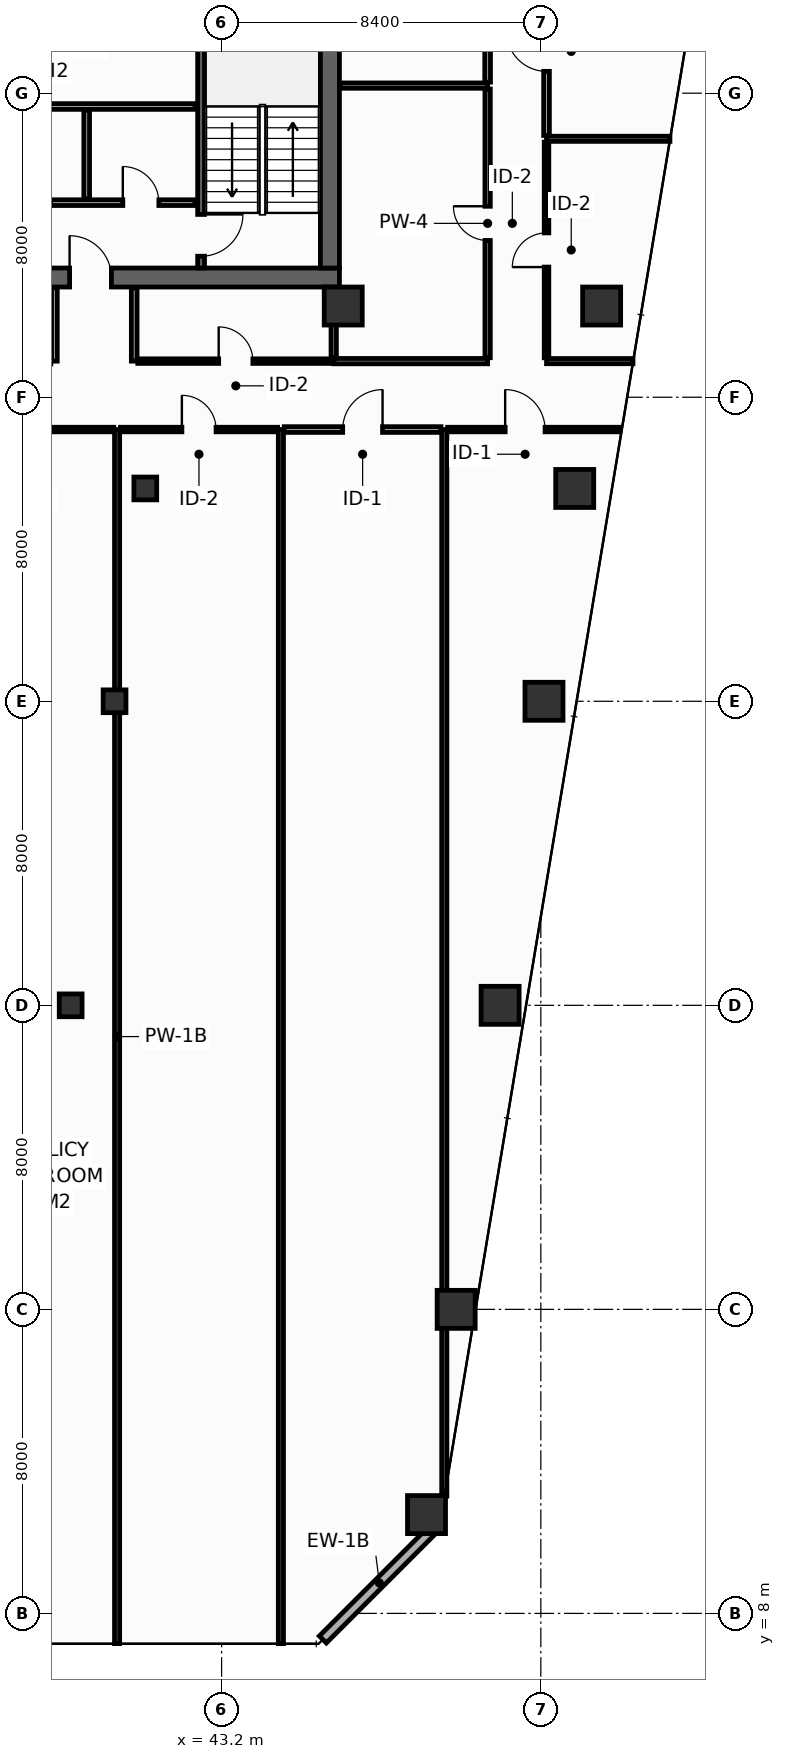
"""IFC4 building model, lengths in metres.
Left out: names, types, materials, properties, quantities, classifications, styles, units other than length and angle.
Written with IfcOpenShell. Run it as: python <this file> out.ifc"""

import sys

from ifc_helpers import new_model, si_unit, direction, frame, frame_2d, origin, origin_2d, place, context, subcontext, project, spatial, rectangle, hollow_rectangle, extrude, element, fill, save


model = new_model("IFC4")
c1 = context("Model", 3, precision=1e-05, world=origin(), true_north=direction((0.0, 1.0)))
c2 = subcontext(c1, "Body", "Model", "MODEL_VIEW")
j1 = project(units=[si_unit("LENGTHUNIT", "METRE"), si_unit("PLANEANGLEUNIT", "RADIAN")], contexts=[c1])
p1 = place(None, origin())
s1 = spatial("IfcSite", under=j1, at=p1, CompositionType="ELEMENT")
p2 = place(p1, origin())
s2 = spatial("IfcBuilding", under=s1, at=p2, CompositionType="ELEMENT")
p3 = place(p2, frame((0.0, 0.0, 144.8)))
s3 = spatial("IfcBuildingStorey", under=s2, at=p3, CompositionType="ELEMENT", Elevation=144.8)
p4 = place(p3, frame((13.6, 43.15, 0.0), z_axis=(0.0, 0.0, 1.0), x_axis=(1.0, 0.0, 0.0)))
e1 = element("IfcWall", 1, at=p4, inside=s3, PredefinedType="SHEAR", context=c2, shape_type="SweptSolid", body=[
    extrude(rectangle(XDim=32.7, YDim=0.5, at=frame_2d((16.35, 0.0))), origin(), (0.0, 0.0, 1.0), 3.55),
])
p5 = place(p4, frame((5.4, 0.0, 0.0)))
e2 = element("IfcOpeningElement", 2, at=p5, cuts=e1, PredefinedType="OPENING", context=c2, shape_type="SweptSolid", body=[
    extrude(rectangle(XDim=1.1, YDim=2.15, at=frame_2d((0.55, 1.075))), frame((0.0, 0.26, 0.0), z_axis=(0.0, -1.0, 0.0), x_axis=(1.0, 0.0, 0.0)), (0.0, 0.0, 1.0), 0.52),
])
p6 = place(p4, frame((25.6, 0.0, 0.0)))
e3 = element("IfcOpeningElement", 3, at=p6, cuts=e1, PredefinedType="OPENING", context=c2, shape_type="SweptSolid", body=[
    extrude(rectangle(XDim=1.1, YDim=2.15, at=frame_2d((0.55, 1.075))), frame((0.0, 0.26, 0.0), z_axis=(0.0, -1.0, 0.0), x_axis=(1.0, 0.0, 0.0)), (0.0, 0.0, 1.0), 0.52),
])
p7 = place(p3, frame((46.05, 43.4, 0.0), z_axis=(0.0, 0.0, 1.0), x_axis=(0.0, 1.0, 0.0)))
e4 = element("IfcWall", 4, at=p7, inside=s3, PredefinedType="SHEAR", context=c2, shape_type="SweptSolid", body=[
    extrude(rectangle(XDim=10.4, YDim=0.5, at=frame_2d((5.2, 0.0))), origin(), (0.0, 0.0, 1.0), 3.55),
])
for number, where, z_axis, x_axis in (
    (5, (46.4, 42.4, 0.0), (0.0, 0.0, 1.0), (1.0, 0.0, 0.0)),
    (6, (53.2, 42.4, 0.0), (0.0, 0.0, 1.0), (1.0, 0.0, 0.0)),
    (7, (48.592, 10.6, 0.0), (0.0, 0.0, 1.0), (1.0, 0.0, 0.0)),
    (8, (49.372, 16.0, 0.0), (0.0, 0.0, 1.0), (1.0, 0.0, 0.0)),
    (9, (50.528, 24.0, 0.0), (0.0, 0.0, 1.0), (1.0, 0.0, 0.0)),
):
    element("IfcColumn", number, at=place(p3, frame(where, z_axis=z_axis, x_axis=x_axis)), inside=s3, PredefinedType="COLUMN", context=c2, shape_type="SweptSolid", body=[
        extrude(hollow_rectangle(XDim=1.0, YDim=1.0, WallThickness=0.045, at=origin_2d()), origin(), (0.0, 0.0, 1.0), 3.8),
    ])
p8 = place(p3, frame((39.228, 24.0, 0.0), z_axis=(0.0, 0.0, 1.0), x_axis=(1.0, 0.0, 0.0)))
e10 = element("IfcColumn", 10, at=p8, inside=s3, PredefinedType="COLUMN", context=c2, shape_type="SweptSolid", body=[
    extrude(hollow_rectangle(XDim=0.6, YDim=0.6, WallThickness=0.028, at=origin_2d()), origin(), (0.0, 0.0, 1.0), 3.8),
])
p9 = place(p3, frame((51.683, 32.0, 0.0), z_axis=(0.0, 0.0, 1.0), x_axis=(1.0, 0.0, 0.0)))
e11 = element("IfcColumn", 11, at=p9, inside=s3, PredefinedType="COLUMN", context=c2, shape_type="SweptSolid", body=[
    extrude(hollow_rectangle(XDim=1.0, YDim=1.0, WallThickness=0.045, at=origin_2d()), origin(), (0.0, 0.0, 1.0), 3.8),
])
p10 = place(p3, frame((40.383, 32.0, 0.0), z_axis=(0.0, 0.0, 1.0), x_axis=(1.0, 0.0, 0.0)))
e12 = element("IfcColumn", 12, at=p10, inside=s3, PredefinedType="COLUMN", context=c2, shape_type="SweptSolid", body=[
    extrude(hollow_rectangle(XDim=0.6, YDim=0.6, WallThickness=0.028, at=origin_2d()), origin(), (0.0, 0.0, 1.0), 3.8),
])
p11 = place(p3, frame((52.492, 37.6, 0.0), z_axis=(0.0, 0.0, 1.0), x_axis=(1.0, 0.0, 0.0)))
e13 = element("IfcColumn", 13, at=p11, inside=s3, PredefinedType="COLUMN", context=c2, shape_type="SweptSolid", body=[
    extrude(hollow_rectangle(XDim=1.0, YDim=1.0, WallThickness=0.045, at=origin_2d()), origin(), (0.0, 0.0, 1.0), 3.8),
])
p12 = place(p3, frame((41.192, 37.6, 0.0), z_axis=(0.0, 0.0, 1.0), x_axis=(1.0, 0.0, 0.0)))
e14 = element("IfcColumn", 14, at=p12, inside=s3, PredefinedType="COLUMN", context=c2, shape_type="SweptSolid", body=[
    extrude(hollow_rectangle(XDim=0.6, YDim=0.6, WallThickness=0.028, at=origin_2d()), origin(), (0.0, 0.0, 1.0), 3.8),
])
p13 = place(p3, frame((42.66, 53.8, 0.0), z_axis=(0.0, 0.0, 1.0), x_axis=(0.0, -1.0, 0.0)))
e15 = element("IfcWall", 15, at=p13, inside=s3, PredefinedType="SHEAR", context=c2, shape_type="SweptSolid", body=[
    extrude(rectangle(XDim=10.4, YDim=0.18, at=frame_2d((5.2, 0.0))), origin(), (0.0, 0.0, 1.0), 3.55),
])
p14 = place(p13, frame((8.99, 0.0, 0.0)))
e16 = element("IfcOpeningElement", 16, at=p14, cuts=e15, PredefinedType="OPENING", context=c2, shape_type="SweptSolid", body=[
    extrude(rectangle(XDim=1.1, YDim=2.15, at=frame_2d((0.55, 1.075))), frame((0.0, 0.1, 0.0), z_axis=(0.0, -1.0, 0.0), x_axis=(1.0, 0.0, 0.0)), (0.0, 0.0, 1.0), 0.2),
])
p15 = place(p3, frame((33.95, 45.12, 0.0), z_axis=(0.0, 0.0, 1.0), x_axis=(1.0, 0.0, 0.0)))
e17 = element("IfcWall", 17, at=p15, inside=s3, PredefinedType="PARTITIONING", context=c2, shape_type="SweptSolid", body=[
    extrude(rectangle(XDim=8.55, YDim=0.15, at=frame_2d((4.275, 0.0))), origin(), (0.0, 0.0, 1.0), 3.55),
])
p16 = place(p15, frame((0.95, 0.0, 0.0)))
e18 = element("IfcOpeningElement", 18, at=p16, cuts=e17, PredefinedType="OPENING", context=c2, shape_type="SweptSolid", body=[
    extrude(rectangle(XDim=0.95, YDim=2.15, at=frame_2d((0.475, 1.075))), frame((0.0, 0.085, 0.0), z_axis=(0.0, -1.0, 0.0), x_axis=(1.0, 0.0, 0.0)), (0.0, 0.0, 1.0), 0.17),
])
p17 = place(p15, frame((3.8, 0.0, 0.0)))
e19 = element("IfcOpeningElement", 19, at=p17, cuts=e17, PredefinedType="OPENING", context=c2, shape_type="SweptSolid", body=[
    extrude(rectangle(XDim=0.95, YDim=2.15, at=frame_2d((0.475, 1.075))), frame((0.0, 0.085, 0.0), z_axis=(0.0, -1.0, 0.0), x_axis=(1.0, 0.0, 0.0)), (0.0, 0.0, 1.0), 0.17),
])
p18 = place(p15, frame((6.65, 0.0, 0.0)))
e20 = element("IfcOpeningElement", 20, at=p18, cuts=e17, PredefinedType="OPENING", context=c2, shape_type="SweptSolid", body=[
    extrude(rectangle(XDim=0.95, YDim=2.15, at=frame_2d((0.475, 1.075))), frame((0.0, 0.085, 0.0), z_axis=(0.0, -1.0, 0.0), x_axis=(1.0, 0.0, 0.0)), (0.0, 0.0, 1.0), 0.17),
])
p19 = place(p3, frame((33.95, 47.65, 0.0), z_axis=(0.0, 0.0, 1.0), x_axis=(1.0, 0.0, 0.0)))
e21 = element("IfcWall", 21, at=p19, inside=s3, PredefinedType="PARTITIONING", context=c2, shape_type="SweptSolid", body=[
    extrude(rectangle(XDim=8.55, YDim=0.15, at=frame_2d((4.275, 0.0))), origin(), (0.0, 0.0, 1.0), 3.55),
])
p20 = place(p3, frame((39.65, 45.22, 0.0), z_axis=(0.0, 0.0, 1.0), x_axis=(0.0, 1.0, 0.0)))
e22 = element("IfcWall", 22, at=p20, inside=s3, PredefinedType="PARTITIONING", context=c2, shape_type="SweptSolid", body=[
    extrude(rectangle(XDim=2.33, YDim=0.15, at=frame_2d((1.165, 0.0))), origin(), (0.0, 0.0, 1.0), 3.55),
])
p21 = place(p3, frame((45.864, 7.313, 0.0), z_axis=(0.0, 0.0, 1.0), x_axis=(0.70707775441, 0.707135806771, 0.0)))
e23 = element("IfcWall", 23, at=p21, inside=s3, PredefinedType="STANDARD", context=c2, shape_type="SweptSolid", body=[
    extrude(rectangle(XDim=4.206, YDim=0.26, at=frame_2d((2.103, 0.0))), origin(), (0.0, 0.0, 1.0), 3.55),
])
p22 = place(p3, frame((46.15, 40.95, 0.0), z_axis=(0.0, 0.0, 1.0), x_axis=(1.0, 0.0, 0.0)))
e24 = element("IfcWall", 24, at=p22, inside=s3, PredefinedType="PARTITIONING", context=c2, shape_type="SweptSolid", body=[
    extrude(rectangle(XDim=4.05, YDim=0.14, at=frame_2d((2.025, 0.0))), origin(), (0.0, 0.0, 1.0), 3.55),
])
p23 = place(p3, frame((46.15, 41.04, 0.0), z_axis=(0.0, 0.0, 1.0), x_axis=(0.0, 1.0, 0.0)))
e25 = element("IfcWall", 25, at=p23, inside=s3, PredefinedType="PARTITIONING", context=c2, shape_type="SweptSolid", body=[
    extrude(rectangle(XDim=1.84, YDim=0.14, at=frame_2d((0.92, 0.0))), origin(), (0.0, 0.0, 1.0), 3.55),
])
p24 = place(p3, frame((46.32, 48.2, 0.0), z_axis=(0.0, 0.0, 1.0), x_axis=(1.0, 0.0, 0.0)))
e26 = element("IfcWall", 26, at=p24, inside=s3, PredefinedType="PARTITIONING", context=c2, shape_type="SweptSolid", body=[
    extrude(rectangle(XDim=3.88, YDim=0.14, at=frame_2d((1.94, 0.0))), origin(), (0.0, 0.0, 1.0), 3.55),
])
p25 = place(p3, frame((50.2, 41.04, 0.0), z_axis=(0.0, 0.0, 1.0), x_axis=(0.0, 1.0, 0.0)))
e27 = element("IfcWall", 27, at=p25, inside=s3, PredefinedType="PARTITIONING", context=c2, shape_type="SweptSolid", body=[
    extrude(rectangle(XDim=7.07, YDim=0.14, at=frame_2d((3.535, 0.0))), origin(), (0.0, 0.0, 1.0), 2.835),
])
p26 = place(p25, frame((3.085, 0.0, 0.0)))
e28 = element("IfcOpeningElement", 28, at=p26, cuts=e27, PredefinedType="OPENING", context=c2, shape_type="SweptSolid", body=[
    extrude(rectangle(XDim=0.9, YDim=2.1, at=frame_2d((0.45, 1.05))), frame((0.0, 0.08, 0.0), z_axis=(0.0, -1.0, 0.0), x_axis=(1.0, 0.0, 0.0)), (0.0, 0.0, 1.0), 0.16),
])
p27 = place(p3, frame((50.2, 48.29, 0.0), z_axis=(0.0, 0.0, 1.0), x_axis=(0.0, 1.0, 0.0)))
e29 = element("IfcWall", 29, at=p27, inside=s3, PredefinedType="PARTITIONING", context=c2, shape_type="SweptSolid", body=[
    extrude(rectangle(XDim=3.98, YDim=0.15, at=frame_2d((1.99, 0.0))), origin(), (0.0, 0.0, 1.0), 3.55),
])
p28 = place(p27, frame((1.49, 0.0, 0.0)))
e30 = element("IfcOpeningElement", 30, at=p28, cuts=e29, PredefinedType="OPENING", context=c2, shape_type="SweptSolid", body=[
    extrude(rectangle(XDim=1.0, YDim=2.15, at=frame_2d((0.5, 1.075))), frame((0.0, 0.085, 0.0), z_axis=(0.0, -1.0, 0.0), x_axis=(1.0, 0.0, 0.0)), (0.0, 0.0, 1.0), 0.17),
])
p29 = place(p3, frame((51.75, 40.95, 0.0), z_axis=(0.0, 0.0, 1.0), x_axis=(1.0, 0.0, 0.0)))
e31 = element("IfcWall", 31, at=p29, inside=s3, PredefinedType="PARTITIONING", context=c2, shape_type="SweptSolid", body=[
    extrude(rectangle(XDim=2.275, YDim=0.135, at=frame_2d((1.137, 0.0))), origin(), (0.0, 0.0, 1.0), 3.035),
])
p30 = place(p3, frame((51.75, 46.8, 0.0), z_axis=(0.0, 0.0, 1.0), x_axis=(1.0, 0.0, 0.0)))
e32 = element("IfcWall", 32, at=p30, inside=s3, PredefinedType="PARTITIONING", context=c2, shape_type="SweptSolid", body=[
    extrude(rectangle(XDim=3.247, YDim=0.135, at=frame_2d((1.624, 0.0))), origin(), (0.0, 0.0, 1.0), 2.835),
])
p31 = place(p3, frame((51.75, 41.038, 0.0), z_axis=(0.0, 0.0, 1.0), x_axis=(0.0, 1.0, 0.0)))
e33 = element("IfcWall", 33, at=p31, inside=s3, PredefinedType="PARTITIONING", context=c2, shape_type="SweptSolid", body=[
    extrude(rectangle(XDim=5.675, YDim=0.12, at=frame_2d((2.837, 0.0))), origin(), (0.0, 0.0, 1.0), 2.835),
])
p32 = place(p31, frame((2.387, 0.0, 0.0)))
e34 = element("IfcOpeningElement", 34, at=p32, cuts=e33, PredefinedType="OPENING", context=c2, shape_type="SweptSolid", body=[
    extrude(rectangle(XDim=0.9, YDim=2.1, at=frame_2d((0.45, 1.05))), frame((0.0, 0.07, 0.0), z_axis=(0.0, -1.0, 0.0), x_axis=(1.0, 0.0, 0.0)), (0.0, 0.0, 1.0), 0.14),
])
p33 = place(p3, frame((51.75, 46.887, 0.0), z_axis=(0.0, 0.0, 1.0), x_axis=(0.0, 1.0, 0.0)))
e35 = element("IfcWall", 35, at=p33, inside=s3, PredefinedType="PARTITIONING", context=c2, shape_type="SweptSolid", body=[
    extrude(rectangle(XDim=4.425, YDim=0.15, at=frame_2d((2.212, 0.0))), origin(), (0.0, 0.0, 1.0), 3.55),
])
p34 = place(p33, frame((1.687, 0.0, 0.0)))
e36 = element("IfcOpeningElement", 36, at=p34, cuts=e35, PredefinedType="OPENING", context=c2, shape_type="SweptSolid", body=[
    extrude(rectangle(XDim=1.05, YDim=2.15, at=frame_2d((0.525, 1.075))), frame((0.0, 0.085, 0.0), z_axis=(0.0, -1.0, 0.0), x_axis=(1.0, 0.0, 0.0)), (0.0, 0.0, 1.0), 0.17),
])
for number, where, z_axis, x_axis in (
    (37, (38.8, 40.95, 0.0), (0.0, 0.0, 1.0), (0.0, 1.0, 0.0)),
    (38, (40.9, 40.95, 0.0), (0.0, 0.0, 1.0), (0.0, 1.0, 0.0)),
):
    element("IfcWall", number, at=place(p3, frame(where, z_axis=z_axis, x_axis=x_axis)), inside=s3, PredefinedType="PARTITIONING", context=c2, shape_type="SweptSolid", body=[
        extrude(rectangle(XDim=1.93, YDim=0.15, at=frame_2d((0.965, 0.0))), origin(), (0.0, 0.0, 1.0), 3.55),
    ])
p35 = place(p3, frame((40.995, 40.95, 0.0), z_axis=(0.0, 0.0, 1.0), x_axis=(1.0, 0.0, 0.0)))
e39 = element("IfcWall", 39, at=p35, inside=s3, PredefinedType="PARTITIONING", context=c2, shape_type="SweptSolid", body=[
    extrude(rectangle(XDim=5.155, YDim=0.12, at=frame_2d((2.577, 0.0))), origin(), (0.0, 0.0, 1.0), 3.55),
])
p36 = place(p35, frame((2.128, 0.0, 0.0)))
e40 = element("IfcOpeningElement", 40, at=p36, cuts=e39, PredefinedType="OPENING", context=c2, shape_type="SweptSolid", body=[
    extrude(rectangle(XDim=0.9, YDim=2.1, at=frame_2d((0.45, 1.05))), frame((0.0, 0.07, 0.0), z_axis=(0.0, -1.0, 0.0), x_axis=(1.0, 0.0, 0.0)), (0.0, 0.0, 1.0), 0.14),
])
for number, where, z_axis, x_axis in (
    (41, (40.45, 7.205, 0.0), (0.0, 0.0, 1.0), (0.0, 1.0, 0.0)),
    (42, (44.76, 7.205, 0.0), (0.0, 0.0, 1.0), (0.0, 1.0, 0.0)),
):
    element("IfcWall", number, at=place(p3, frame(where, z_axis=z_axis, x_axis=x_axis)), inside=s3, PredefinedType="PARTITIONING", context=c2, shape_type="SweptSolid", body=[
        extrude(rectangle(XDim=31.945, YDim=0.135, at=frame_2d((15.972, 0.0))), origin(), (0.0, 0.0, 1.0), 2.835),
    ])
p37 = place(p3, frame((49.06, 11.085, 0.0), z_axis=(0.0, 0.0, 1.0), x_axis=(0.0, 1.0, 0.0)))
e43 = element("IfcWall", 43, at=p37, inside=s3, PredefinedType="PARTITIONING", context=c2, shape_type="SweptSolid", body=[
    extrude(rectangle(XDim=28.064, YDim=0.135, at=frame_2d((14.032, 0.0))), origin(), (0.0, 0.0, 1.0), 2.835),
])
p38 = place(p3, frame((36.15, 39.15, 0.0), z_axis=(0.0, 0.0, 1.0), x_axis=(1.0, 0.0, 0.0)))
e44 = element("IfcWall", 44, at=p38, inside=s3, PredefinedType="PARTITIONING", context=c2, shape_type="SweptSolid", body=[
    extrude(rectangle(XDim=4.213, YDim=0.12, at=frame_2d((2.106, 0.0))), origin(), (0.0, 0.0, 1.0), 2.835),
])
p39 = place(p38, frame((1.656, 0.0, 0.0)))
e45 = element("IfcOpeningElement", 45, at=p39, cuts=e44, PredefinedType="OPENING", context=c2, shape_type="SweptSolid", body=[
    extrude(rectangle(XDim=0.9, YDim=2.1, at=frame_2d((0.45, 1.05))), frame((0.0, 0.07, 0.0), z_axis=(0.0, -1.0, 0.0), x_axis=(1.0, 0.0, 0.0)), (0.0, 0.0, 1.0), 0.14),
])
p40 = place(p3, frame((40.538, 39.15, 0.0), z_axis=(0.0, 0.0, 1.0), x_axis=(1.0, 0.0, 0.0)))
e46 = element("IfcWall", 46, at=p40, inside=s3, PredefinedType="PARTITIONING", context=c2, shape_type="SweptSolid", body=[
    extrude(rectangle(XDim=4.135, YDim=0.12, at=frame_2d((2.067, 0.0))), origin(), (0.0, 0.0, 1.0), 3.55),
])
p41 = place(p40, frame((1.617, 0.0, 0.0)))
e47 = element("IfcOpeningElement", 47, at=p41, cuts=e46, PredefinedType="OPENING", context=c2, shape_type="SweptSolid", body=[
    extrude(rectangle(XDim=0.9, YDim=2.1, at=frame_2d((0.45, 1.05))), frame((0.0, 0.07, 0.0), z_axis=(0.0, -1.0, 0.0), x_axis=(1.0, 0.0, 0.0)), (0.0, 0.0, 1.0), 0.14),
])
p42 = place(p3, frame((44.847, 39.15, 0.0), z_axis=(0.0, 0.0, 1.0), x_axis=(1.0, 0.0, 0.0)))
e48 = element("IfcWall", 48, at=p42, inside=s3, PredefinedType="PARTITIONING", context=c2, shape_type="SweptSolid", body=[
    extrude(rectangle(XDim=4.125, YDim=0.15, at=frame_2d((2.062, 0.0))), origin(), (0.0, 0.0, 1.0), 3.55),
])
p43 = place(p42, frame((1.538, 0.0, 0.0)))
e49 = element("IfcOpeningElement", 49, at=p43, cuts=e48, PredefinedType="OPENING", context=c2, shape_type="SweptSolid", body=[
    extrude(rectangle(XDim=1.05, YDim=2.15, at=frame_2d((0.525, 1.075))), frame((0.0, 0.085, 0.0), z_axis=(0.0, -1.0, 0.0), x_axis=(1.0, 0.0, 0.0)), (0.0, 0.0, 1.0), 0.17),
])
p44 = place(p3, frame((49.147, 39.15, 0.0), z_axis=(0.0, 0.0, 1.0), x_axis=(1.0, 0.0, 0.0)))
e50 = element("IfcWall", 50, at=p44, inside=s3, PredefinedType="PARTITIONING", context=c2, shape_type="SweptSolid", body=[
    extrude(rectangle(XDim=4.519, YDim=0.12, at=frame_2d((2.259, 0.0))), origin(), (0.0, 0.0, 1.0), 3.035),
])
p45 = place(p44, frame((1.514, 0.0, 0.0)))
e51 = element("IfcOpeningElement", 51, at=p45, cuts=e50, PredefinedType="OPENING", context=c2, shape_type="SweptSolid", body=[
    extrude(rectangle(XDim=1.05, YDim=2.15, at=frame_2d((0.525, 1.075))), frame((0.0, 0.07, 0.0), z_axis=(0.0, -1.0, 0.0), x_axis=(1.0, 0.0, 0.0)), (0.0, 0.0, 1.0), 0.14),
])
p46 = place(p14, origin())
e52 = element("IfcDoor", 52, at=p46, inside=s3, OperationType="SINGLE_SWING_LEFT", PredefinedType="DOOR", context=c2, shape_type="SweptSolid", body=[
    extrude(rectangle(XDim=1.1, YDim=2.15, at=frame_2d((0.55, 1.075))), frame((0.0, 0.025, 0.0), z_axis=(0.0, -1.0, 0.0), x_axis=(1.0, 0.0, 0.0)), (0.0, 0.0, 1.0), 0.05),
])
fill(e16, e52)
p47 = place(p6, origin())
e53 = element("IfcDoor", 53, at=p47, inside=s3, OperationType="SINGLE_SWING_LEFT", PredefinedType="DOOR", context=c2, shape_type="SweptSolid", body=[
    extrude(rectangle(XDim=1.1, YDim=2.15, at=frame_2d((0.55, 1.075))), frame((0.0, 0.025, 0.0), z_axis=(0.0, -1.0, 0.0), x_axis=(1.0, 0.0, 0.0)), (0.0, 0.0, 1.0), 0.05),
])
fill(e3, e53)
p48 = place(p18, origin())
e54 = element("IfcDoor", 54, at=p48, inside=s3, OperationType="SINGLE_SWING_LEFT", PredefinedType="DOOR", context=c2, shape_type="SweptSolid", body=[
    extrude(rectangle(XDim=0.95, YDim=2.15, at=frame_2d((0.475, 1.075))), frame((0.0, 0.025, 0.0), z_axis=(0.0, -1.0, 0.0), x_axis=(1.0, 0.0, 0.0)), (0.0, 0.0, 1.0), 0.05),
])
fill(e20, e54)
p49 = place(p26, origin())
e55 = element("IfcDoor", 55, at=p49, inside=s3, OperationType="SINGLE_SWING_RIGHT", PredefinedType="DOOR", context=c2, shape_type="SweptSolid", body=[
    extrude(rectangle(XDim=0.9, YDim=2.1, at=frame_2d((0.45, 1.05))), frame((0.0, 0.025, 0.0), z_axis=(0.0, -1.0, 0.0), x_axis=(1.0, 0.0, 0.0)), (0.0, 0.0, 1.0), 0.05),
])
fill(e28, e55)
p50 = place(p32, origin())
e56 = element("IfcDoor", 56, at=p50, inside=s3, OperationType="SINGLE_SWING_LEFT", PredefinedType="DOOR", context=c2, shape_type="SweptSolid", body=[
    extrude(rectangle(XDim=0.9, YDim=2.1, at=frame_2d((0.45, 1.05))), frame((0.0, 0.025, 0.0), z_axis=(0.0, -1.0, 0.0), x_axis=(1.0, 0.0, 0.0)), (0.0, 0.0, 1.0), 0.05),
])
fill(e34, e56)
p51 = place(p34, origin())
e57 = element("IfcDoor", 57, at=p51, inside=s3, OperationType="SINGLE_SWING_RIGHT", PredefinedType="DOOR", context=c2, shape_type="SweptSolid", body=[
    extrude(rectangle(XDim=1.05, YDim=2.15, at=frame_2d((0.525, 1.075))), frame((0.0, 0.025, 0.0), z_axis=(0.0, -1.0, 0.0), x_axis=(1.0, 0.0, 0.0)), (0.0, 0.0, 1.0), 0.05),
])
fill(e36, e57)
p52 = place(p36, origin())
e58 = element("IfcDoor", 58, at=p52, inside=s3, OperationType="SINGLE_SWING_LEFT", PredefinedType="DOOR", context=c2, shape_type="SweptSolid", body=[
    extrude(rectangle(XDim=0.9, YDim=2.1, at=frame_2d((0.45, 1.05))), frame((0.0, 0.025, 0.0), z_axis=(0.0, -1.0, 0.0), x_axis=(1.0, 0.0, 0.0)), (0.0, 0.0, 1.0), 0.05),
])
fill(e40, e58)
p53 = place(p41, origin())
e59 = element("IfcDoor", 59, at=p53, inside=s3, OperationType="SINGLE_SWING_LEFT", PredefinedType="DOOR", context=c2, shape_type="SweptSolid", body=[
    extrude(rectangle(XDim=0.9, YDim=2.1, at=frame_2d((0.45, 1.05))), frame((0.0, 0.025, 0.0), z_axis=(0.0, -1.0, 0.0), x_axis=(1.0, 0.0, 0.0)), (0.0, 0.0, 1.0), 0.05),
])
fill(e47, e59)
p54 = place(p43, origin())
e60 = element("IfcDoor", 60, at=p54, inside=s3, OperationType="SINGLE_SWING_RIGHT", PredefinedType="DOOR", context=c2, shape_type="SweptSolid", body=[
    extrude(rectangle(XDim=1.05, YDim=2.15, at=frame_2d((0.525, 1.075))), frame((0.0, 0.025, 0.0), z_axis=(0.0, -1.0, 0.0), x_axis=(1.0, 0.0, 0.0)), (0.0, 0.0, 1.0), 0.05),
])
fill(e49, e60)
p55 = place(p45, origin())
e61 = element("IfcDoor", 61, at=p55, inside=s3, OperationType="SINGLE_SWING_LEFT", PredefinedType="DOOR", context=c2, shape_type="SweptSolid", body=[
    extrude(rectangle(XDim=1.05, YDim=2.15, at=frame_2d((0.525, 1.075))), frame((0.0, 0.025, 0.0), z_axis=(0.0, -1.0, 0.0), x_axis=(1.0, 0.0, 0.0)), (0.0, 0.0, 1.0), 0.05),
])
fill(e51, e61)
save(model, sys.argv[1])
